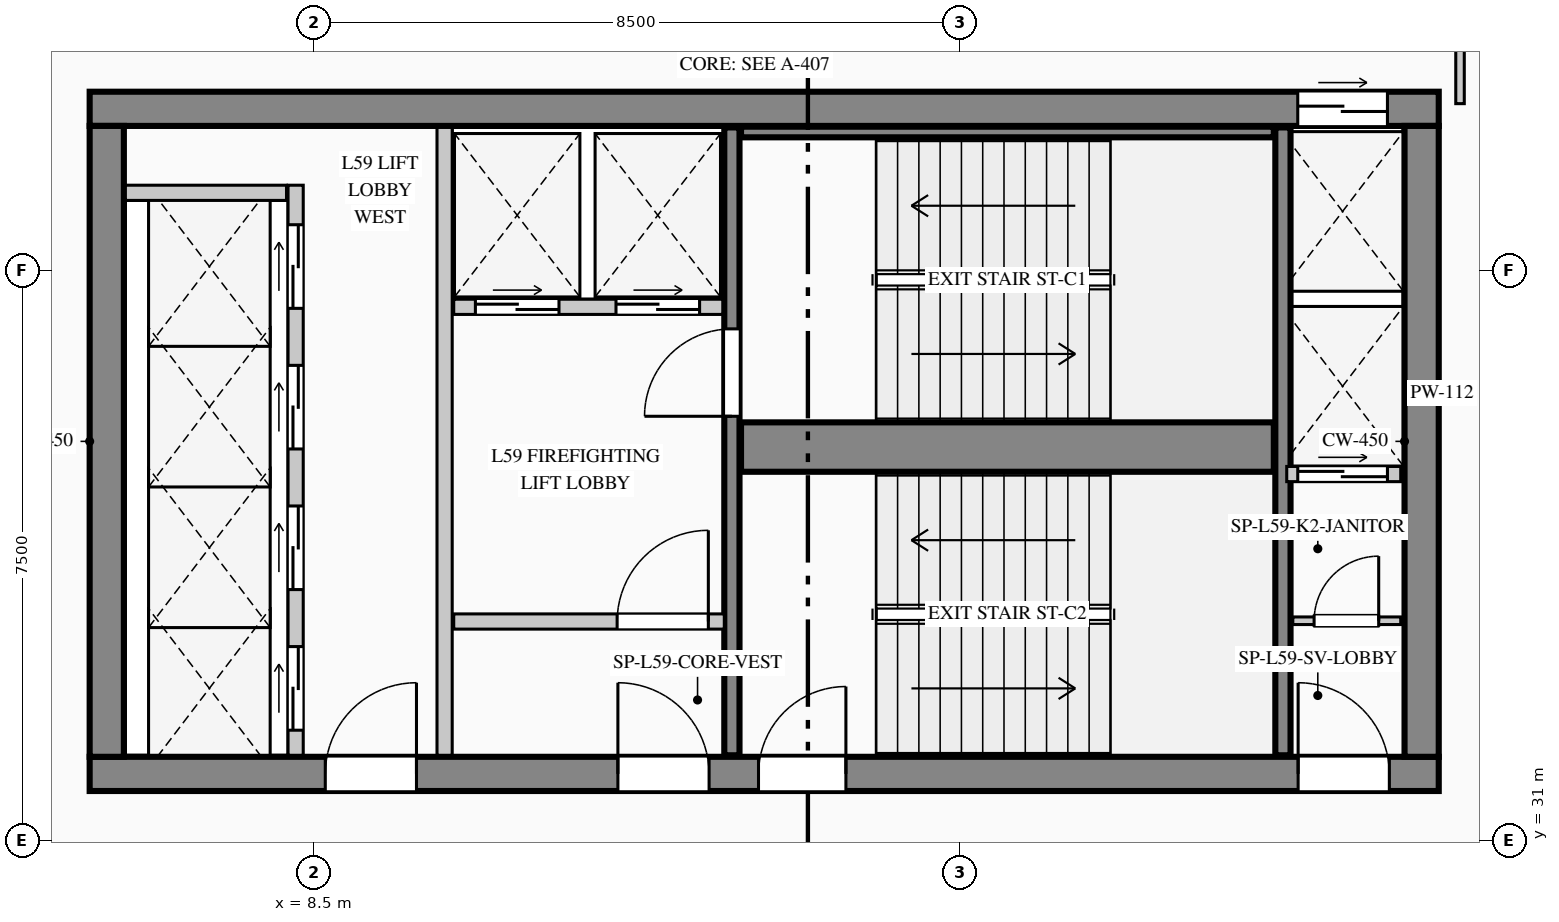
"""IFC4 building model, lengths in metres.
Left out: names, types, materials, properties, quantities, classifications, styles, units other than length and angle.
Written with IfcOpenShell. Run it as: python <this file> out.ifc"""

import sys

from ifc_helpers import new_model, si_unit, direction, frame, frame_2d, origin, place, context, subcontext, project, spatial, rectangle, extrude, element, fill, save


model = new_model("IFC4")
c1 = context("Model", 3, precision=1e-05, world=origin(), true_north=direction((0.0, 1.0)))
c2 = subcontext(c1, "Body", "Model", "MODEL_VIEW")
j1 = project(units=[si_unit("LENGTHUNIT", "METRE"), si_unit("PLANEANGLEUNIT", "RADIAN")], contexts=[c1])
p1 = place(None, origin())
s1 = spatial("IfcSite", under=j1, at=p1, CompositionType="ELEMENT")
p2 = place(p1, origin())
s2 = spatial("IfcBuilding", under=s1, at=p2, CompositionType="ELEMENT")
p3 = place(p2, frame((0.0, 0.0, 246.95)))
s3 = spatial("IfcBuildingStorey", under=s2, at=p3, CompositionType="ELEMENT", Elevation=246.95)
p4 = place(p3, frame((5.55, 40.625, 0.0), z_axis=(0.0, 0.0, 1.0), x_axis=(1.0, 0.0, 0.0)))
e1 = element("IfcWall", 1, at=p4, inside=s3, PredefinedType="SHEAR", context=c2, shape_type="SweptSolid", body=[
    extrude(rectangle(XDim=17.75, YDim=0.45, at=frame_2d((8.875, 0.0))), origin(), (0.0, 0.0, 1.0), 3.95),
])
p5 = place(p4, frame((15.895, 0.0, 0.0)))
e2 = element("IfcOpeningElement", 2, at=p5, cuts=e1, PredefinedType="OPENING", context=c2, shape_type="SweptSolid", body=[
    extrude(rectangle(XDim=1.18, YDim=2.25, at=frame_2d((0.59, 1.125))), frame((0.0, 0.235, 0.0), z_axis=(0.0, -1.0, 0.0), x_axis=(1.0, 0.0, 0.0)), (0.0, 0.0, 1.0), 0.47),
])
p6 = place(p3, frame((5.55, 31.875, 0.0), z_axis=(0.0, 0.0, 1.0), x_axis=(1.0, 0.0, 0.0)))
e3 = element("IfcWall", 3, at=p6, inside=s3, PredefinedType="SHEAR", context=c2, shape_type="SweptSolid", body=[
    extrude(rectangle(XDim=17.75, YDim=0.45, at=frame_2d((8.875, 0.0))), origin(), (0.0, 0.0, 1.0), 3.95),
])
p7 = place(p6, frame((3.1, 0.0, 0.0)))
e4 = element("IfcOpeningElement", 4, at=p7, cuts=e3, PredefinedType="OPENING", context=c2, shape_type="SweptSolid", body=[
    extrude(rectangle(XDim=1.2, YDim=2.2, at=frame_2d((0.6, 1.1))), frame((0.0, 0.235, 0.0), z_axis=(0.0, -1.0, 0.0), x_axis=(1.0, 0.0, 0.0)), (0.0, 0.0, 1.0), 0.47),
])
p8 = place(p6, frame((6.95, 0.0, 0.0)))
e5 = element("IfcOpeningElement", 5, at=p8, cuts=e3, PredefinedType="OPENING", context=c2, shape_type="SweptSolid", body=[
    extrude(rectangle(XDim=1.2, YDim=2.2, at=frame_2d((0.6, 1.1))), frame((0.0, 0.235, 0.0), z_axis=(0.0, -1.0, 0.0), x_axis=(1.0, 0.0, 0.0)), (0.0, 0.0, 1.0), 0.47),
])
p9 = place(p6, frame((8.8, 0.0, 0.0)))
e6 = element("IfcOpeningElement", 6, at=p9, cuts=e3, PredefinedType="OPENING", context=c2, shape_type="SweptSolid", body=[
    extrude(rectangle(XDim=1.15, YDim=2.2, at=frame_2d((0.575, 1.1))), frame((0.0, 0.235, 0.0), z_axis=(0.0, -1.0, 0.0), x_axis=(1.0, 0.0, 0.0)), (0.0, 0.0, 1.0), 0.47),
])
p10 = place(p6, frame((15.9, 0.0, 0.0)))
e7 = element("IfcOpeningElement", 7, at=p10, cuts=e3, PredefinedType="OPENING", context=c2, shape_type="SweptSolid", body=[
    extrude(rectangle(XDim=1.2, YDim=2.2, at=frame_2d((0.6, 1.1))), frame((0.0, 0.235, 0.0), z_axis=(0.0, -1.0, 0.0), x_axis=(1.0, 0.0, 0.0)), (0.0, 0.0, 1.0), 0.47),
])
for number, where, z_axis, x_axis in (
    (8, (5.775, 32.1, 0.0), (0.0, 0.0, 1.0), (0.0, 1.0, 0.0)),
    (9, (23.075, 32.1, 0.0), (0.0, 0.0, 1.0), (0.0, 1.0, 0.0)),
):
    element("IfcWall", number, at=place(p3, frame(where, z_axis=z_axis, x_axis=x_axis)), inside=s3, PredefinedType="SHEAR", context=c2, shape_type="SweptSolid", body=[
        extrude(rectangle(XDim=8.3, YDim=0.45, at=frame_2d((4.15, 0.0))), origin(), (0.0, 0.0, 1.0), 3.95),
    ])
p11 = place(p3, frame((14.0, 32.12, 0.0), z_axis=(0.0, 0.0, 1.0), x_axis=(0.0, 1.0, 0.0)))
e10 = element("IfcWall", 10, at=p11, inside=s3, PredefinedType="SHEAR", context=c2, shape_type="SweptSolid", body=[
    extrude(rectangle(XDim=8.26, YDim=0.2, at=frame_2d((4.13, 0.0))), origin(), (0.0, 0.0, 1.0), 3.95),
])
p12 = place(p11, frame((4.46, 0.0, 0.0)))
e11 = element("IfcOpeningElement", 11, at=p12, cuts=e10, PredefinedType="OPENING", context=c2, shape_type="SweptSolid", body=[
    extrude(rectangle(XDim=1.15, YDim=2.2, at=frame_2d((0.575, 1.1))), frame((0.0, 0.11, 0.0), z_axis=(0.0, -1.0, 0.0), x_axis=(1.0, 0.0, 0.0)), (0.0, 0.0, 1.0), 0.22),
])
p13 = place(p3, frame((14.12, 36.175, 0.0), z_axis=(0.0, 0.0, 1.0), x_axis=(1.0, 0.0, 0.0)))
e12 = element("IfcWall", 12, at=p13, inside=s3, PredefinedType="SHEAR", context=c2, shape_type="SweptSolid", body=[
    extrude(rectangle(XDim=7.01, YDim=0.65, at=frame_2d((3.505, 0.0))), origin(), (0.0, 0.0, 1.0), 3.95),
])
p14 = place(p3, frame((21.25, 32.12, 0.0), z_axis=(0.0, 0.0, 1.0), x_axis=(0.0, 1.0, 0.0)))
e13 = element("IfcWall", 13, at=p14, inside=s3, PredefinedType="SHEAR", context=c2, shape_type="SweptSolid", body=[
    extrude(rectangle(XDim=8.26, YDim=0.2, at=frame_2d((4.13, 0.0))), origin(), (0.0, 0.0, 1.0), 3.95),
])
p15 = place(p3, frame((14.12, 40.32, 0.0), z_axis=(0.0, 0.0, 1.0), x_axis=(1.0, 0.0, 0.0)))
e14 = element("IfcWall", 14, at=p15, inside=s3, PredefinedType="SHEAR", context=c2, shape_type="SweptSolid", body=[
    extrude(rectangle(XDim=7.01, YDim=0.14, at=frame_2d((3.505, 0.0))), origin(), (0.0, 0.0, 1.0), 3.95),
])
p16 = place(p3, frame((6.933, 4.52, 0.0), z_axis=(0.0, 0.0, 1.0), x_axis=(-0.109965284523, 0.993935428587, 0.0)))
e15 = element("IfcWall", 15, at=p16, inside=s3, PredefinedType="STANDARD", context=c2, shape_type="SweptSolid", body=[
    extrude(rectangle(XDim=37.186, YDim=0.24, at=frame_2d((18.593, 0.0))), origin(), (0.0, 0.0, 1.0), 3.6),
])
p17 = place(p16, frame((12.562, 0.0, 0.9)))
e16 = element("IfcOpeningElement", 16, at=p17, cuts=e15, PredefinedType="OPENING", context=c2, shape_type="SweptSolid", body=[
    extrude(rectangle(XDim=1.65, YDim=1.95, at=frame_2d((0.825, 0.975))), frame((0.0, 0.13, 0.0), z_axis=(0.0, -1.0, 0.0), x_axis=(1.0, 0.0, 0.0)), (0.0, 0.0, 1.0), 0.26),
])
p18 = place(p3, frame((8.26, 32.12, 0.0), z_axis=(0.0, 0.0, 1.0), x_axis=(0.0, 1.0, 0.0)))
e17 = element("IfcWall", 17, at=p18, inside=s3, PredefinedType="PARTITIONING", context=c2, shape_type="SweptSolid", body=[
    extrude(rectangle(XDim=7.5, YDim=0.2, at=frame_2d((3.75, 0.0))), origin(), (0.0, 0.0, 1.0), 3.6),
])
p19 = place(p18, frame((0.33, 0.0, 0.0)))
e18 = element("IfcOpeningElement", 18, at=p19, cuts=e17, PredefinedType="OPENING", context=c2, shape_type="SweptSolid", body=[
    extrude(rectangle(XDim=1.1, YDim=2.2, at=frame_2d((0.55, 1.1))), frame((0.0, 0.11, 0.0), z_axis=(0.0, -1.0, 0.0), x_axis=(1.0, 0.0, 0.0)), (0.0, 0.0, 1.0), 0.22),
])
p20 = place(p18, frame((2.18, 0.0, 0.0)))
e19 = element("IfcOpeningElement", 19, at=p20, cuts=e17, PredefinedType="OPENING", context=c2, shape_type="SweptSolid", body=[
    extrude(rectangle(XDim=1.1, YDim=2.2, at=frame_2d((0.55, 1.1))), frame((0.0, 0.11, 0.0), z_axis=(0.0, -1.0, 0.0), x_axis=(1.0, 0.0, 0.0)), (0.0, 0.0, 1.0), 0.22),
])
p21 = place(p18, frame((4.03, 0.0, 0.0)))
e20 = element("IfcOpeningElement", 20, at=p21, cuts=e17, PredefinedType="OPENING", context=c2, shape_type="SweptSolid", body=[
    extrude(rectangle(XDim=1.1, YDim=2.2, at=frame_2d((0.55, 1.1))), frame((0.0, 0.11, 0.0), z_axis=(0.0, -1.0, 0.0), x_axis=(1.0, 0.0, 0.0)), (0.0, 0.0, 1.0), 0.22),
])
p22 = place(p18, frame((5.88, 0.0, 0.0)))
e21 = element("IfcOpeningElement", 21, at=p22, cuts=e17, PredefinedType="OPENING", context=c2, shape_type="SweptSolid", body=[
    extrude(rectangle(XDim=1.1, YDim=2.2, at=frame_2d((0.55, 1.1))), frame((0.0, 0.11, 0.0), z_axis=(0.0, -1.0, 0.0), x_axis=(1.0, 0.0, 0.0)), (0.0, 0.0, 1.0), 0.22),
])
p23 = place(p3, frame((6.02, 39.52, 0.0), z_axis=(0.0, 0.0, 1.0), x_axis=(1.0, 0.0, 0.0)))
e22 = element("IfcWall", 22, at=p23, inside=s3, PredefinedType="PARTITIONING", context=c2, shape_type="SweptSolid", body=[
    extrude(rectangle(XDim=2.12, YDim=0.2, at=frame_2d((1.06, 0.0))), origin(), (0.0, 0.0, 1.0), 3.6),
])
p24 = place(p3, frame((10.22, 32.12, 0.0), z_axis=(0.0, 0.0, 1.0), x_axis=(0.0, 1.0, 0.0)))
e23 = element("IfcWall", 23, at=p24, inside=s3, PredefinedType="PARTITIONING", context=c2, shape_type="SweptSolid", body=[
    extrude(rectangle(XDim=8.26, YDim=0.2, at=frame_2d((4.13, 0.0))), origin(), (0.0, 0.0, 1.0), 3.6),
])
p25 = place(p3, frame((10.34, 38.02, 0.0), z_axis=(0.0, 0.0, 1.0), x_axis=(1.0, 0.0, 0.0)))
e24 = element("IfcWall", 24, at=p25, inside=s3, PredefinedType="PARTITIONING", context=c2, shape_type="SweptSolid", body=[
    extrude(rectangle(XDim=3.54, YDim=0.2, at=frame_2d((1.77, 0.0))), origin(), (0.0, 0.0, 1.0), 3.6),
])
p26 = place(p25, frame((0.285, 0.0, 0.0)))
e25 = element("IfcOpeningElement", 25, at=p26, cuts=e24, PredefinedType="OPENING", context=c2, shape_type="SweptSolid", body=[
    extrude(rectangle(XDim=1.1, YDim=2.2, at=frame_2d((0.55, 1.1))), frame((0.0, 0.11, 0.0), z_axis=(0.0, -1.0, 0.0), x_axis=(1.0, 0.0, 0.0)), (0.0, 0.0, 1.0), 0.22),
])
p27 = place(p25, frame((2.135, 0.0, 0.0)))
e26 = element("IfcOpeningElement", 26, at=p27, cuts=e24, PredefinedType="OPENING", context=c2, shape_type="SweptSolid", body=[
    extrude(rectangle(XDim=1.1, YDim=2.2, at=frame_2d((0.55, 1.1))), frame((0.0, 0.11, 0.0), z_axis=(0.0, -1.0, 0.0), x_axis=(1.0, 0.0, 0.0)), (0.0, 0.0, 1.0), 0.22),
])
p28 = place(p3, frame((10.34, 33.88, 0.0), z_axis=(0.0, 0.0, 1.0), x_axis=(1.0, 0.0, 0.0)))
e27 = element("IfcWall", 27, at=p28, inside=s3, PredefinedType="PARTITIONING", context=c2, shape_type="SweptSolid", body=[
    extrude(rectangle(XDim=3.56, YDim=0.2, at=frame_2d((1.78, 0.0))), origin(), (0.0, 0.0, 1.0), 3.6),
])
p29 = place(p28, frame((2.15, 0.0, 0.0)))
e28 = element("IfcOpeningElement", 28, at=p29, cuts=e27, PredefinedType="OPENING", context=c2, shape_type="SweptSolid", body=[
    extrude(rectangle(XDim=1.2, YDim=2.2, at=frame_2d((0.6, 1.1))), frame((0.0, 0.11, 0.0), z_axis=(0.0, -1.0, 0.0), x_axis=(1.0, 0.0, 0.0)), (0.0, 0.0, 1.0), 0.22),
])
p30 = place(p3, frame((21.38, 33.89, 0.0), z_axis=(0.0, 0.0, 1.0), x_axis=(1.0, 0.0, 0.0)))
e29 = element("IfcWall", 29, at=p30, inside=s3, PredefinedType="PARTITIONING", context=c2, shape_type="SweptSolid", body=[
    extrude(rectangle(XDim=1.42, YDim=0.1, at=frame_2d((0.71, 0.0))), origin(), (0.0, 0.0, 1.0), 3.6),
])
p31 = place(p30, frame((0.28, 0.0, 0.0)))
e30 = element("IfcOpeningElement", 30, at=p31, cuts=e29, PredefinedType="OPENING", context=c2, shape_type="SweptSolid", body=[
    extrude(rectangle(XDim=0.85, YDim=2.1, at=frame_2d((0.425, 1.05))), frame((0.0, 0.06, 0.0), z_axis=(0.0, -1.0, 0.0), x_axis=(1.0, 0.0, 0.0)), (0.0, 0.0, 1.0), 0.12),
])
p32 = place(p3, frame((21.3, 35.82, 0.0), z_axis=(0.0, 0.0, 1.0), x_axis=(1.0, 0.0, 0.0)))
e31 = element("IfcWall", 31, at=p32, inside=s3, PredefinedType="PARTITIONING", context=c2, shape_type="SweptSolid", body=[
    extrude(rectangle(XDim=1.5, YDim=0.2, at=frame_2d((0.75, 0.0))), origin(), (0.0, 0.0, 1.0), 3.6),
])
p33 = place(p32, frame((0.145, 0.0, 0.0)))
e32 = element("IfcOpeningElement", 32, at=p33, cuts=e31, PredefinedType="OPENING", context=c2, shape_type="SweptSolid", body=[
    extrude(rectangle(XDim=1.18, YDim=2.25, at=frame_2d((0.59, 1.125))), frame((0.0, 0.11, 0.0), z_axis=(0.0, -1.0, 0.0), x_axis=(1.0, 0.0, 0.0)), (0.0, 0.0, 1.0), 0.22),
])
p34 = place(p3, frame((23.58, 40.693, 0.0), z_axis=(0.0, 0.0, 1.0), x_axis=(0.0, 1.0, 0.0)))
e33 = element("IfcWall", 33, at=p34, inside=s3, PredefinedType="PARTITIONING", context=c2, shape_type="SweptSolid", body=[
    extrude(rectangle(XDim=2.582, YDim=0.112, at=frame_2d((1.291, 0.0))), origin(), (0.0, 0.0, 1.0), 3.6),
])
p35 = place(p7, origin())
e34 = element("IfcDoor", 34, at=p35, inside=s3, OperationType="SINGLE_SWING_RIGHT", PredefinedType="DOOR", context=c2, shape_type="SweptSolid", body=[
    extrude(rectangle(XDim=1.2, YDim=2.2, at=frame_2d((0.6, 1.1))), frame((0.0, 0.025, 0.0), z_axis=(0.0, -1.0, 0.0), x_axis=(1.0, 0.0, 0.0)), (0.0, 0.0, 1.0), 0.05),
])
fill(e4, e34)
p36 = place(p8, origin())
e35 = element("IfcDoor", 35, at=p36, inside=s3, OperationType="SINGLE_SWING_LEFT", PredefinedType="DOOR", context=c2, shape_type="SweptSolid", body=[
    extrude(rectangle(XDim=1.2, YDim=2.2, at=frame_2d((0.6, 1.1))), frame((0.0, 0.025, 0.0), z_axis=(0.0, -1.0, 0.0), x_axis=(1.0, 0.0, 0.0)), (0.0, 0.0, 1.0), 0.05),
])
fill(e5, e35)
p37 = place(p9, origin())
e36 = element("IfcDoor", 36, at=p37, inside=s3, OperationType="SINGLE_SWING_RIGHT", PredefinedType="DOOR", context=c2, shape_type="SweptSolid", body=[
    extrude(rectangle(XDim=1.15, YDim=2.2, at=frame_2d((0.575, 1.1))), frame((0.0, 0.025, 0.0), z_axis=(0.0, -1.0, 0.0), x_axis=(1.0, 0.0, 0.0)), (0.0, 0.0, 1.0), 0.05),
])
fill(e6, e36)
p38 = place(p10, origin())
e37 = element("IfcDoor", 37, at=p38, inside=s3, OperationType="SINGLE_SWING_LEFT", PredefinedType="DOOR", context=c2, shape_type="SweptSolid", body=[
    extrude(rectangle(XDim=1.2, YDim=2.2, at=frame_2d((0.6, 1.1))), frame((0.0, 0.025, 0.0), z_axis=(0.0, -1.0, 0.0), x_axis=(1.0, 0.0, 0.0)), (0.0, 0.0, 1.0), 0.05),
])
fill(e7, e37)
p39 = place(p29, origin())
e38 = element("IfcDoor", 38, at=p39, inside=s3, OperationType="SINGLE_SWING_RIGHT", PredefinedType="DOOR", context=c2, shape_type="SweptSolid", body=[
    extrude(rectangle(XDim=1.2, YDim=2.2, at=frame_2d((0.6, 1.1))), frame((0.0, 0.025, 0.0), z_axis=(0.0, -1.0, 0.0), x_axis=(1.0, 0.0, 0.0)), (0.0, 0.0, 1.0), 0.05),
])
fill(e28, e38)
p40 = place(p31, origin())
e39 = element("IfcDoor", 39, at=p40, inside=s3, OperationType="SINGLE_SWING_RIGHT", PredefinedType="DOOR", context=c2, shape_type="SweptSolid", body=[
    extrude(rectangle(XDim=0.85, YDim=2.1, at=frame_2d((0.425, 1.05))), frame((0.0, 0.025, 0.0), z_axis=(0.0, -1.0, 0.0), x_axis=(1.0, 0.0, 0.0)), (0.0, 0.0, 1.0), 0.05),
])
fill(e30, e39)
p41 = place(p12, origin())
e40 = element("IfcDoor", 40, at=p41, inside=s3, OperationType="SINGLE_SWING_LEFT", PredefinedType="DOOR", context=c2, shape_type="SweptSolid", body=[
    extrude(rectangle(XDim=1.15, YDim=2.2, at=frame_2d((0.575, 1.1))), frame((0.0, 0.025, 0.0), z_axis=(0.0, -1.0, 0.0), x_axis=(1.0, 0.0, 0.0)), (0.0, 0.0, 1.0), 0.05),
])
fill(e11, e40)
p42 = place(p19, origin())
e41 = element("IfcDoor", 41, at=p42, inside=s3, OperationType="DOUBLE_DOOR_SLIDING", PredefinedType="DOOR", context=c2, shape_type="SweptSolid", body=[
    extrude(rectangle(XDim=1.1, YDim=2.2, at=frame_2d((0.55, 1.1))), frame((0.0, 0.025, 0.0), z_axis=(0.0, -1.0, 0.0), x_axis=(1.0, 0.0, 0.0)), (0.0, 0.0, 1.0), 0.05),
])
fill(e18, e41)
p43 = place(p20, origin())
e42 = element("IfcDoor", 42, at=p43, inside=s3, OperationType="DOUBLE_DOOR_SLIDING", PredefinedType="DOOR", context=c2, shape_type="SweptSolid", body=[
    extrude(rectangle(XDim=1.1, YDim=2.2, at=frame_2d((0.55, 1.1))), frame((0.0, 0.025, 0.0), z_axis=(0.0, -1.0, 0.0), x_axis=(1.0, 0.0, 0.0)), (0.0, 0.0, 1.0), 0.05),
])
fill(e19, e42)
p44 = place(p21, origin())
e43 = element("IfcDoor", 43, at=p44, inside=s3, OperationType="DOUBLE_DOOR_SLIDING", PredefinedType="DOOR", context=c2, shape_type="SweptSolid", body=[
    extrude(rectangle(XDim=1.1, YDim=2.2, at=frame_2d((0.55, 1.1))), frame((0.0, 0.025, 0.0), z_axis=(0.0, -1.0, 0.0), x_axis=(1.0, 0.0, 0.0)), (0.0, 0.0, 1.0), 0.05),
])
fill(e20, e43)
p45 = place(p22, origin())
e44 = element("IfcDoor", 44, at=p45, inside=s3, OperationType="DOUBLE_DOOR_SLIDING", PredefinedType="DOOR", context=c2, shape_type="SweptSolid", body=[
    extrude(rectangle(XDim=1.1, YDim=2.2, at=frame_2d((0.55, 1.1))), frame((0.0, 0.025, 0.0), z_axis=(0.0, -1.0, 0.0), x_axis=(1.0, 0.0, 0.0)), (0.0, 0.0, 1.0), 0.05),
])
fill(e21, e44)
p46 = place(p26, origin())
e45 = element("IfcDoor", 45, at=p46, inside=s3, OperationType="DOUBLE_DOOR_SLIDING", PredefinedType="DOOR", context=c2, shape_type="SweptSolid", body=[
    extrude(rectangle(XDim=1.1, YDim=2.2, at=frame_2d((0.55, 1.1))), frame((0.0, 0.025, 0.0), z_axis=(0.0, -1.0, 0.0), x_axis=(1.0, 0.0, 0.0)), (0.0, 0.0, 1.0), 0.05),
])
fill(e25, e45)
p47 = place(p27, origin())
e46 = element("IfcDoor", 46, at=p47, inside=s3, OperationType="DOUBLE_DOOR_SLIDING", PredefinedType="DOOR", context=c2, shape_type="SweptSolid", body=[
    extrude(rectangle(XDim=1.1, YDim=2.2, at=frame_2d((0.55, 1.1))), frame((0.0, 0.025, 0.0), z_axis=(0.0, -1.0, 0.0), x_axis=(1.0, 0.0, 0.0)), (0.0, 0.0, 1.0), 0.05),
])
fill(e26, e46)
p48 = place(p5, origin())
e47 = element("IfcDoor", 47, at=p48, inside=s3, OperationType="DOUBLE_DOOR_SLIDING", PredefinedType="DOOR", context=c2, shape_type="SweptSolid", body=[
    extrude(rectangle(XDim=1.18, YDim=2.25, at=frame_2d((0.59, 1.125))), frame((0.0, 0.025, 0.0), z_axis=(0.0, -1.0, 0.0), x_axis=(1.0, 0.0, 0.0)), (0.0, 0.0, 1.0), 0.05),
])
fill(e2, e47)
p49 = place(p33, origin())
e48 = element("IfcDoor", 48, at=p49, inside=s3, OperationType="DOUBLE_DOOR_SLIDING", PredefinedType="DOOR", context=c2, shape_type="SweptSolid", body=[
    extrude(rectangle(XDim=1.18, YDim=2.25, at=frame_2d((0.59, 1.125))), frame((0.0, 0.025, 0.0), z_axis=(0.0, -1.0, 0.0), x_axis=(1.0, 0.0, 0.0)), (0.0, 0.0, 1.0), 0.05),
])
fill(e32, e48)
save(model, sys.argv[1])
